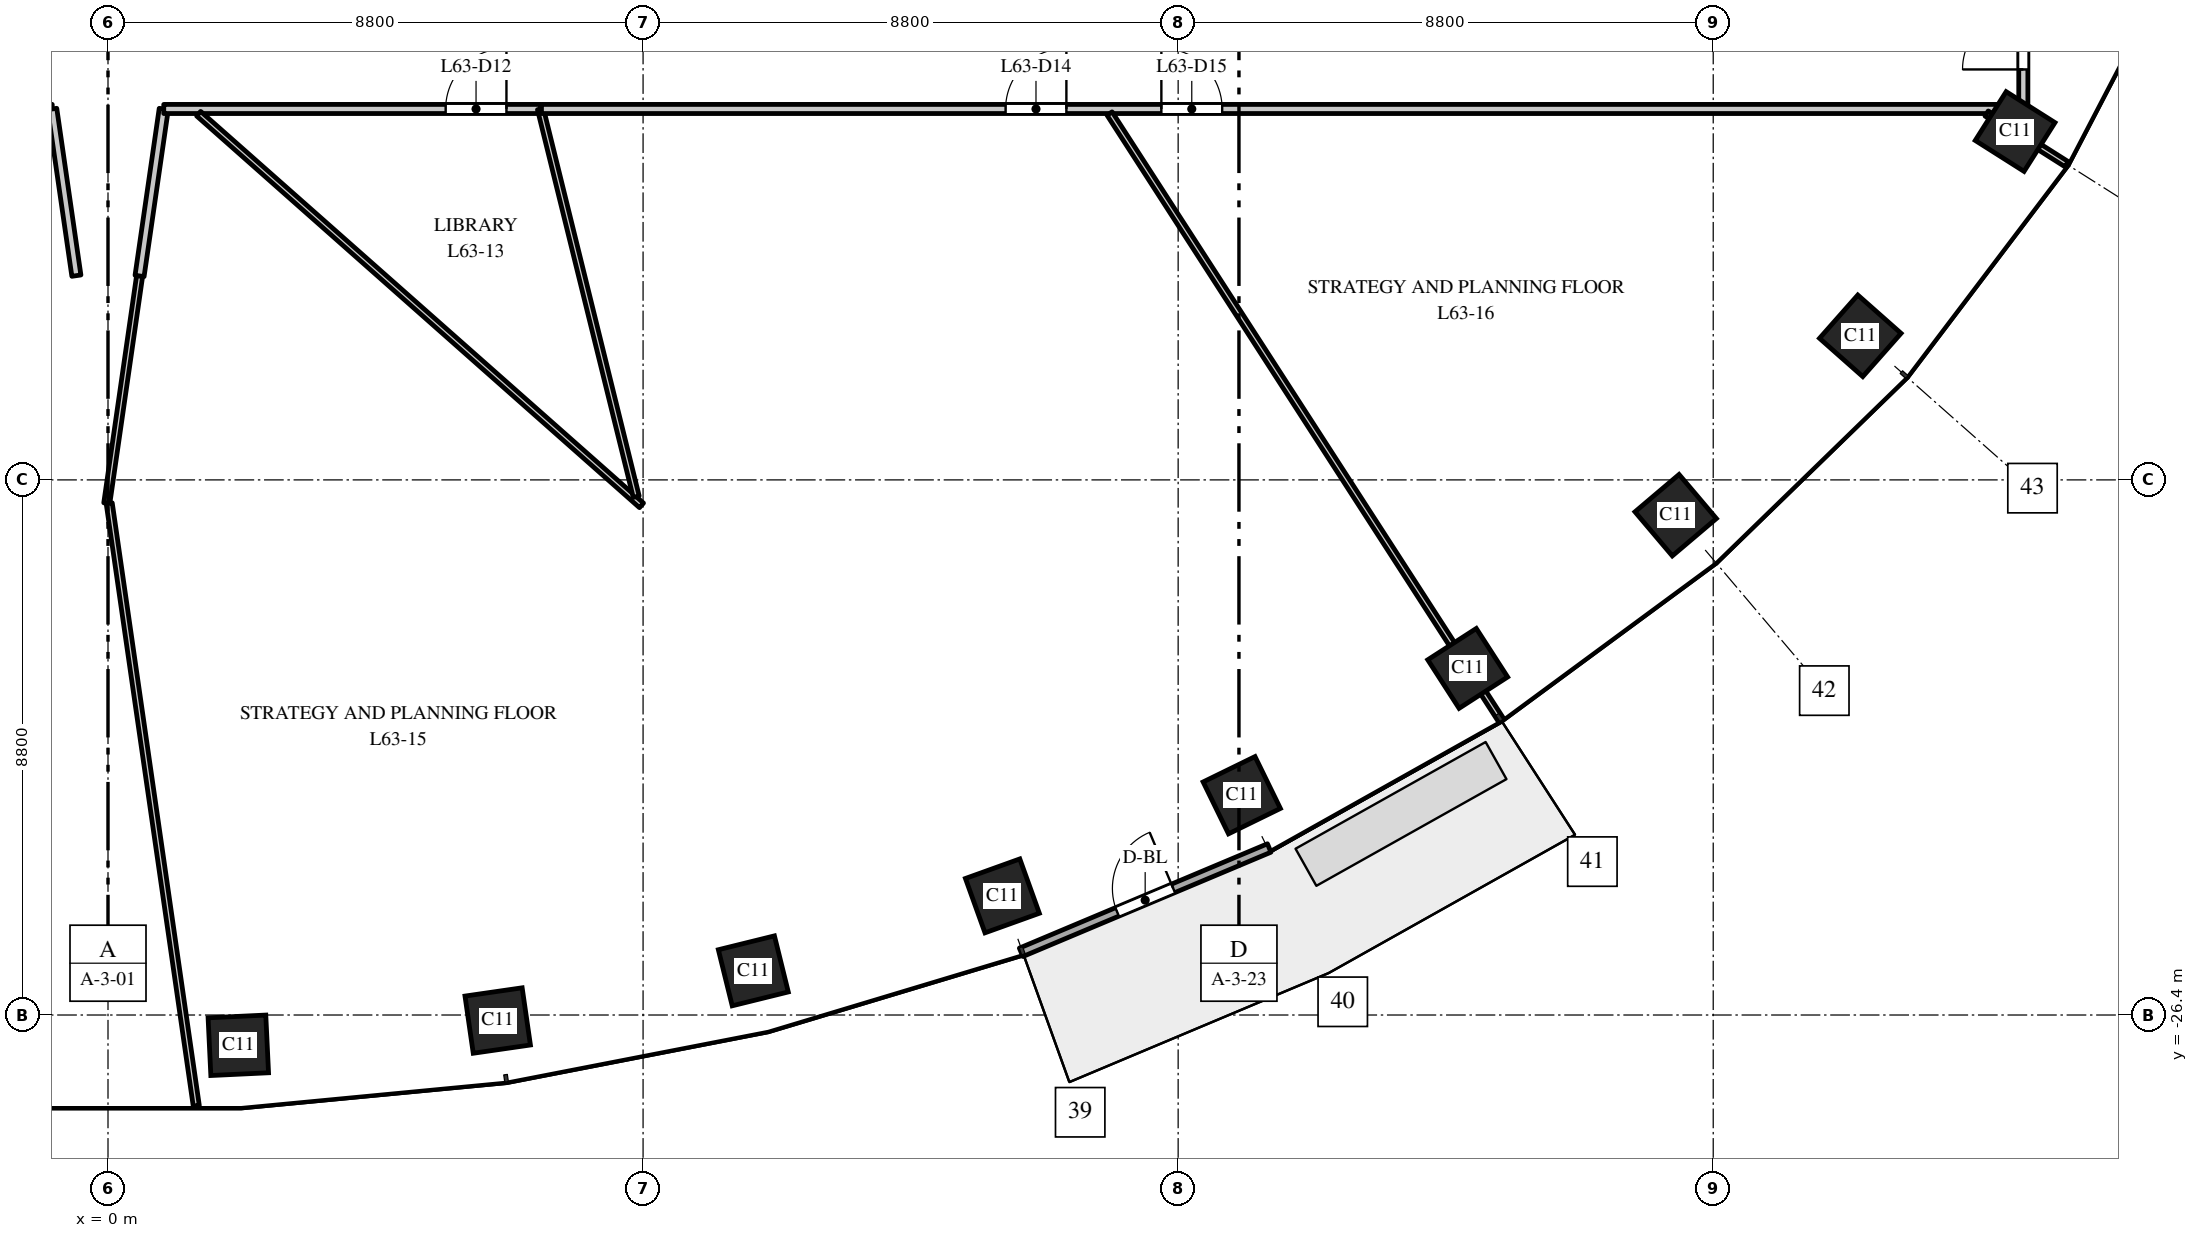
"""IFC4 building model, lengths in metres.
Left out: names, types, materials, properties, quantities, classifications, styles, units other than length and angle.
Written with IfcOpenShell. Run it as: python <this file> out.ifc"""

import sys

from ifc_helpers import new_model, si_unit, direction, frame, frame_2d, origin, origin_2d, place, context, subcontext, project, spatial, rectangle, extrude, element, fill, save


model = new_model("IFC4")
c1 = context("Model", 3, precision=1e-05, world=origin(), true_north=direction((0.0, 1.0)))
c2 = subcontext(c1, "Body", "Model", "MODEL_VIEW")
j1 = project(units=[si_unit("LENGTHUNIT", "METRE"), si_unit("PLANEANGLEUNIT", "RADIAN")], contexts=[c1])
p1 = place(None, origin())
s1 = spatial("IfcSite", under=j1, at=p1, CompositionType="ELEMENT")
p2 = place(p1, origin())
s2 = spatial("IfcBuilding", under=s1, at=p2, CompositionType="ELEMENT")
p3 = place(p2, frame((0.0, 0.0, 295.0)))
s3 = spatial("IfcBuildingStorey", under=s2, at=p3, CompositionType="ELEMENT", Elevation=295.0)
for number, where, z_axis, x_axis in (
    (1, (2.143, -26.898, 0.0), (0.0, 0.0, 1.0), (0.999, 0.048, 0.0)),
    (2, (6.409, -26.491, 0.0), (0.0, 0.0, 1.0), (0.99, 0.143, 0.0)),
    (3, (10.613, -25.674, 0.0), (0.0, 0.0, 1.0), (0.971, 0.24, 0.0)),
    (4, (14.709, -24.441, 0.0), (0.0, 0.0, 1.0), (0.941, 0.338, 0.0)),
    (5, (18.646, -22.785, 0.0), (0.0, 0.0, 1.0), (0.898, 0.439, 0.0)),
    (6, (22.362, -20.7, 0.0), (0.0, 0.0, 1.0), (0.84, 0.542, 0.0)),
    (7, (25.783, -18.18, 0.0), (0.0, 0.0, 1.0), (0.763, 0.646, 0.0)),
    (8, (28.819, -15.23, 0.0), (0.0, 0.0, 1.0), (0.663, 0.749, 0.0)),
    (9, (31.365, -11.871, 0.0), (0.0, 0.0, 1.0), (0.535, 0.845, 0.0)),
):
    element("IfcColumn", number, at=place(p3, frame(where, z_axis=z_axis, x_axis=x_axis)), inside=s3, PredefinedType="COLUMN", context=c2, shape_type="SweptSolid", body=[
        extrude(rectangle(XDim=0.95, YDim=0.95, at=origin_2d()), origin(), (0.0, 0.0, 1.0), 4.0),
    ])
p4 = place(p3, frame((15.018, -25.369, 0.0), z_axis=(0.0, 0.0, 1.0), x_axis=(0.921816985161, 0.387625393736, 0.0)))
e10 = element("IfcWall", 10, at=p4, inside=s3, PredefinedType="STANDARD", context=c2, shape_type="SweptSolid", body=[
    extrude(rectangle(XDim=4.426, YDim=0.15, at=frame_2d((2.213, 0.0))), origin(), (0.0, 0.0, 1.0), 3.7),
])
p5 = place(p4, frame((1.713, 0.0, 0.0)))
e11 = element("IfcOpeningElement", 11, at=p5, cuts=e10, PredefinedType="OPENING", context=c2, shape_type="SweptSolid", body=[
    extrude(rectangle(XDim=1.0, YDim=2.4, at=frame_2d((0.5, 1.2))), frame((0.0, 0.085, 0.0), z_axis=(0.0, -1.0, 0.0), x_axis=(1.0, 0.0, 0.0)), (0.0, 0.0, 1.0), 0.17),
])
p6 = place(p3, frame((-10.003, -11.5, 0.0), z_axis=(0.0, 0.0, 1.0), x_axis=(1.0, 0.0, 0.0)))
e12 = element("IfcWall", 12, at=p6, inside=s3, PredefinedType="PARTITIONING", context=c2, shape_type="SweptSolid", body=[
    extrude(rectangle(XDim=9.086, YDim=0.15, at=frame_2d((4.543, 0.0))), origin(), (0.0, 0.0, 1.0), 2.75),
])
p7 = place(p6, frame((0.585, 0.0, 0.0)))
e13 = element("IfcOpeningElement", 13, at=p7, cuts=e12, PredefinedType="OPENING", context=c2, shape_type="SweptSolid", body=[
    extrude(rectangle(XDim=1.0, YDim=2.1, at=frame_2d((0.5, 1.05))), frame((0.0, 0.085, 0.0), z_axis=(0.0, -1.0, 0.0), x_axis=(1.0, 0.0, 0.0)), (0.0, 0.0, 1.0), 0.17),
])
p8 = place(p3, frame((-0.917, -11.5, 0.0), z_axis=(0.0, 0.0, 1.0), x_axis=(0.143333974909, -0.989674376569, 0.0)))
e14 = element("IfcWall", 14, at=p8, inside=s3, PredefinedType="PARTITIONING", context=c2, shape_type="SweptSolid", body=[
    extrude(rectangle(XDim=2.77, YDim=0.15, at=frame_2d((1.385, 0.0))), origin(), (0.0, 0.0, 1.0), 2.85),
])
p9 = place(p3, frame((-0.02, -17.984, 0.0), z_axis=(0.0, 0.0, 1.0), x_axis=(0.142959355808, 0.989728560054, 0.0)))
e15 = element("IfcWall", 15, at=p9, inside=s3, PredefinedType="PARTITIONING", context=c2, shape_type="SweptSolid", body=[
    extrude(rectangle(XDim=3.778, YDim=0.1, at=frame_2d((1.889, 0.0))), origin(), (0.0, 0.0, 1.0), 3.7),
])
p10 = place(p3, frame((0.02, -17.984, 0.0), z_axis=(0.0, 0.0, 1.0), x_axis=(0.143001630517, -0.989722452847, 0.0)))
e16 = element("IfcWall", 16, at=p10, inside=s3, PredefinedType="PARTITIONING", context=c2, shape_type="SweptSolid", body=[
    extrude(rectangle(XDim=10.013, YDim=0.1, at=frame_2d((5.007, 0.0))), origin(), (0.0, 0.0, 1.0), 3.0),
])
p11 = place(p3, frame((0.519, -14.246, 0.0), z_axis=(0.0, 0.0, 1.0), x_axis=(0.14341658309, 0.989662408953, 0.0)))
e17 = element("IfcWall", 17, at=p11, inside=s3, PredefinedType="PARTITIONING", context=c2, shape_type="SweptSolid", body=[
    extrude(rectangle(XDim=2.775, YDim=0.15, at=frame_2d((1.387, 0.0))), origin(), (0.0, 0.0, 1.0), 3.7),
])
p12 = place(p3, frame((0.917, -11.5, 0.0), z_axis=(0.0, 0.0, 1.0), x_axis=(1.0, 0.0, 0.0)))
e18 = element("IfcWall", 18, at=p12, inside=s3, PredefinedType="PARTITIONING", context=c2, shape_type="SweptSolid", body=[
    extrude(rectangle(XDim=6.195, YDim=0.15, at=frame_2d((3.098, 0.0))), origin(), (0.0, 0.0, 1.0), 2.85),
])
p13 = place(p12, frame((4.636, 0.0, 0.0)))
e19 = element("IfcOpeningElement", 19, at=p13, cuts=e18, PredefinedType="OPENING", context=c2, shape_type="SweptSolid", body=[
    extrude(rectangle(XDim=1.0, YDim=2.1, at=frame_2d((0.5, 1.05))), frame((0.0, 0.085, 0.0), z_axis=(0.0, -1.0, 0.0), x_axis=(1.0, 0.0, 0.0)), (0.0, 0.0, 1.0), 0.17),
])
p14 = place(p3, frame((1.491, -11.578, 0.0), z_axis=(0.0, 0.0, 1.0), x_axis=(0.749070847305, -0.662489898577, 0.0)))
e20 = element("IfcWall", 20, at=p14, inside=s3, PredefinedType="PARTITIONING", context=c2, shape_type="SweptSolid", body=[
    extrude(rectangle(XDim=9.723, YDim=0.1, at=frame_2d((4.861, 0.0))), origin(), (0.0, 0.0, 1.0), 2.85),
])
p15 = place(p3, frame((7.112, -11.5, 0.0), z_axis=(0.0, 0.0, 1.0), x_axis=(0.23980569949, -0.970820903407, 0.0)))
e21 = element("IfcWall", 21, at=p15, inside=s3, PredefinedType="PARTITIONING", context=c2, shape_type="SweptSolid", body=[
    extrude(rectangle(XDim=6.568, YDim=0.1, at=frame_2d((3.284, 0.0))), origin(), (0.0, 0.0, 1.0), 2.85),
])
p16 = place(p3, frame((7.129, -11.5, 0.0), z_axis=(0.0, 0.0, 1.0), x_axis=(1.0, 0.0, 0.0)))
e22 = element("IfcWall", 22, at=p16, inside=s3, PredefinedType="PARTITIONING", context=c2, shape_type="SweptSolid", body=[
    extrude(rectangle(XDim=24.371, YDim=0.15, at=frame_2d((12.186, 0.0))), origin(), (0.0, 0.0, 1.0), 2.75),
])
p17 = place(p16, frame((7.633, 0.0, 0.0)))
e23 = element("IfcOpeningElement", 23, at=p17, cuts=e22, PredefinedType="OPENING", context=c2, shape_type="SweptSolid", body=[
    extrude(rectangle(XDim=1.0, YDim=2.1, at=frame_2d((0.5, 1.05))), frame((0.0, 0.085, 0.0), z_axis=(0.0, -1.0, 0.0), x_axis=(1.0, 0.0, 0.0)), (0.0, 0.0, 1.0), 0.17),
])
p18 = place(p16, frame((10.195, 0.0, 0.0)))
e24 = element("IfcOpeningElement", 24, at=p18, cuts=e22, PredefinedType="OPENING", context=c2, shape_type="SweptSolid", body=[
    extrude(rectangle(XDim=1.0, YDim=2.1, at=frame_2d((0.5, 1.05))), frame((0.0, 0.085, 0.0), z_axis=(0.0, -1.0, 0.0), x_axis=(1.0, 0.0, 0.0)), (0.0, 0.0, 1.0), 0.17),
])
p19 = place(p3, frame((16.472, -11.575, 0.0), z_axis=(0.0, 0.0, 1.0), x_axis=(0.54229092728, -0.840190782019, 0.0)))
e25 = element("IfcWall", 25, at=p19, inside=s3, PredefinedType="PARTITIONING", context=c2, shape_type="SweptSolid", body=[
    extrude(rectangle(XDim=11.863, YDim=0.1, at=frame_2d((5.931, 0.0))), origin(), (0.0, 0.0, 1.0), 3.7),
])
p20 = place(p3, frame((30.897, -11.575, 0.0), z_axis=(0.0, 0.0, 1.0), x_axis=(0.844757626245, -0.535149094086, 0.0)))
e26 = element("IfcWall", 26, at=p20, inside=s3, PredefinedType="PARTITIONING", context=c2, shape_type="SweptSolid", body=[
    extrude(rectangle(XDim=1.557, YDim=0.1, at=frame_2d((0.778, 0.0))), origin(), (0.0, 0.0, 1.0), 3.0),
])
p21 = place(p3, frame((31.5, -11.5, 0.0), z_axis=(0.0, 0.0, 1.0), x_axis=(0.0, 1.0, 0.0)))
e27 = element("IfcWall", 27, at=p21, inside=s3, PredefinedType="PARTITIONING", context=c2, shape_type="SweptSolid", body=[
    extrude(rectangle(XDim=3.0, YDim=0.15, at=frame_2d((1.5, 0.0))), origin(), (0.0, 0.0, 1.0), 3.0),
])
p22 = place(p21, frame((0.65, 0.0, 0.0)))
e28 = element("IfcOpeningElement", 28, at=p22, cuts=e27, PredefinedType="OPENING", context=c2, shape_type="SweptSolid", body=[
    extrude(rectangle(XDim=1.0, YDim=2.1, at=frame_2d((0.5, 1.05))), frame((0.0, 0.085, 0.0), z_axis=(0.0, -1.0, 0.0), x_axis=(1.0, 0.0, 0.0)), (0.0, 0.0, 1.0), 0.17),
])
p23 = place(p5, origin())
e29 = element("IfcDoor", 29, at=p23, inside=s3, OperationType="SINGLE_SWING_RIGHT", PredefinedType="DOOR", context=c2, shape_type="SweptSolid", body=[
    extrude(rectangle(XDim=1.0, YDim=2.4, at=frame_2d((0.5, 1.2))), frame((0.0, 0.025, 0.0), z_axis=(0.0, -1.0, 0.0), x_axis=(1.0, 0.0, 0.0)), (0.0, 0.0, 1.0), 0.05),
])
fill(e11, e29)
p24 = place(p13, origin())
e30 = element("IfcDoor", 30, at=p24, inside=s3, OperationType="SINGLE_SWING_RIGHT", PredefinedType="DOOR", context=c2, shape_type="SweptSolid", body=[
    extrude(rectangle(XDim=1.0, YDim=2.1, at=frame_2d((0.5, 1.05))), frame((0.0, 0.025, 0.0), z_axis=(0.0, -1.0, 0.0), x_axis=(1.0, 0.0, 0.0)), (0.0, 0.0, 1.0), 0.05),
])
fill(e19, e30)
p25 = place(p17, origin())
e31 = element("IfcDoor", 31, at=p25, inside=s3, OperationType="SINGLE_SWING_RIGHT", PredefinedType="DOOR", context=c2, shape_type="SweptSolid", body=[
    extrude(rectangle(XDim=1.0, YDim=2.1, at=frame_2d((0.5, 1.05))), frame((0.0, 0.025, 0.0), z_axis=(0.0, -1.0, 0.0), x_axis=(1.0, 0.0, 0.0)), (0.0, 0.0, 1.0), 0.05),
])
fill(e23, e31)
p26 = place(p18, origin())
e32 = element("IfcDoor", 32, at=p26, inside=s3, OperationType="SINGLE_SWING_LEFT", PredefinedType="DOOR", context=c2, shape_type="SweptSolid", body=[
    extrude(rectangle(XDim=1.0, YDim=2.1, at=frame_2d((0.5, 1.05))), frame((0.0, 0.025, 0.0), z_axis=(0.0, -1.0, 0.0), x_axis=(1.0, 0.0, 0.0)), (0.0, 0.0, 1.0), 0.05),
])
fill(e24, e32)
p27 = place(p22, origin())
e33 = element("IfcDoor", 33, at=p27, inside=s3, OperationType="SINGLE_SWING_LEFT", PredefinedType="DOOR", context=c2, shape_type="SweptSolid", body=[
    extrude(rectangle(XDim=1.0, YDim=2.1, at=frame_2d((0.5, 1.05))), frame((0.0, 0.025, 0.0), z_axis=(0.0, -1.0, 0.0), x_axis=(1.0, 0.0, 0.0)), (0.0, 0.0, 1.0), 0.05),
])
fill(e28, e33)
save(model, sys.argv[1])
